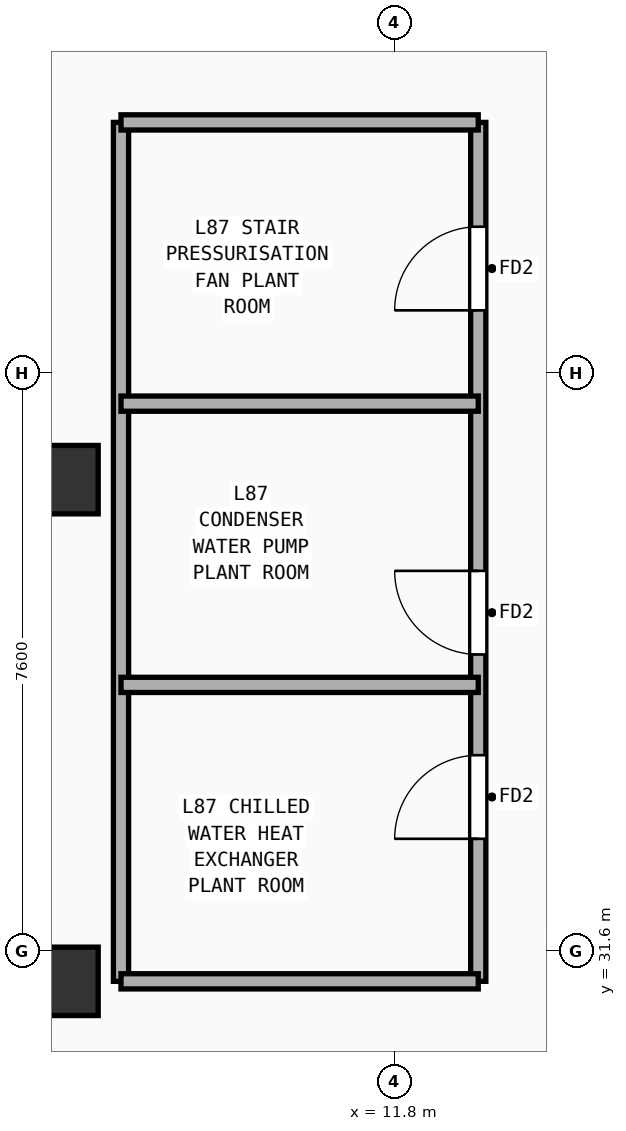
"""IFC4 building model, lengths in metres.
Left out: names, types, materials, properties, quantities, classifications, styles, units other than length and angle.
Written with IfcOpenShell. Run it as: python <this file> out.ifc"""

import sys

from ifc_helpers import new_model, si_unit, direction, frame, frame_2d, origin, origin_2d, place, context, subcontext, project, spatial, rectangle, extrude, element, fill, save


model = new_model("IFC4")
c1 = context("Model", 3, precision=1e-05, world=origin(), true_north=direction((0.0, 1.0)))
c2 = subcontext(c1, "Body", "Model", "MODEL_VIEW")
j1 = project(units=[si_unit("LENGTHUNIT", "METRE"), si_unit("PLANEANGLEUNIT", "RADIAN")], contexts=[c1])
p1 = place(None, origin())
s1 = spatial("IfcSite", under=j1, at=p1, CompositionType="ELEMENT")
p2 = place(p1, origin())
s2 = spatial("IfcBuilding", under=s1, at=p2, CompositionType="ELEMENT")
p3 = place(p2, frame((0.0, 0.0, 338.8)))
s3 = spatial("IfcBuildingStorey", under=s2, at=p3, CompositionType="ELEMENT", Elevation=338.8)
for number, where, z_axis, x_axis in (
    (1, (7.45, 31.2, 0.0), (0.0, 0.0, 1.0), (1.0, 0.0, 0.0)),
    (2, (7.45, 37.8, 0.0), (0.0, 0.0, 1.0), (1.0, 0.0, 0.0)),
):
    element("IfcColumn", number, at=place(p3, frame(where, z_axis=z_axis, x_axis=x_axis)), inside=s3, PredefinedType="COLUMN", context=c2, shape_type="SweptSolid", body=[
        extrude(rectangle(XDim=0.9, YDim=0.9, at=origin_2d()), origin(), (0.0, 0.0, 1.0), 5.02),
    ])
p4 = place(p3, frame((12.9, 31.2, 0.0), z_axis=(0.0, 0.0, 1.0), x_axis=(0.0, 1.0, 0.0)))
e3 = element("IfcWall", 3, at=p4, inside=s3, PredefinedType="PARTITIONING", context=c2, shape_type="SweptSolid", body=[
    extrude(rectangle(XDim=11.3, YDim=0.2, at=frame_2d((5.65, 0.0))), origin(), (0.0, 0.0, 1.0), 5.02),
])
p5 = place(p4, frame((1.875, 0.0, 0.0)))
e4 = element("IfcOpeningElement", 4, at=p5, cuts=e3, PredefinedType="OPENING", context=c2, shape_type="SweptSolid", body=[
    extrude(rectangle(XDim=1.1, YDim=2.2, at=frame_2d((0.55, 1.1))), frame((0.0, 0.11, 0.0), z_axis=(0.0, -1.0, 0.0), x_axis=(1.0, 0.0, 0.0)), (0.0, 0.0, 1.0), 0.22),
])
p6 = place(p4, frame((4.3, 0.0, 0.0)))
e5 = element("IfcOpeningElement", 5, at=p6, cuts=e3, PredefinedType="OPENING", context=c2, shape_type="SweptSolid", body=[
    extrude(rectangle(XDim=1.1, YDim=2.2, at=frame_2d((0.55, 1.1))), frame((0.0, 0.11, 0.0), z_axis=(0.0, -1.0, 0.0), x_axis=(1.0, 0.0, 0.0)), (0.0, 0.0, 1.0), 0.22),
])
p7 = place(p4, frame((8.827, 0.0, 0.0)))
e6 = element("IfcOpeningElement", 6, at=p7, cuts=e3, PredefinedType="OPENING", context=c2, shape_type="SweptSolid", body=[
    extrude(rectangle(XDim=1.1, YDim=2.2, at=frame_2d((0.55, 1.1))), frame((0.0, 0.11, 0.0), z_axis=(0.0, -1.0, 0.0), x_axis=(1.0, 0.0, 0.0)), (0.0, 0.0, 1.0), 0.22),
])
p8 = place(p3, frame((8.2, 31.2, 0.0), z_axis=(0.0, 0.0, 1.0), x_axis=(0.0, 1.0, 0.0)))
e7 = element("IfcWall", 7, at=p8, inside=s3, PredefinedType="PARTITIONING", context=c2, shape_type="SweptSolid", body=[
    extrude(rectangle(XDim=11.3, YDim=0.2, at=frame_2d((5.65, 0.0))), origin(), (0.0, 0.0, 1.0), 5.02),
])
p9 = place(p3, frame((8.2, 31.2, 0.0), z_axis=(0.0, 0.0, 1.0), x_axis=(1.0, 0.0, 0.0)))
e8 = element("IfcWall", 8, at=p9, inside=s3, PredefinedType="PARTITIONING", context=c2, shape_type="SweptSolid", body=[
    extrude(rectangle(XDim=4.7, YDim=0.2, at=frame_2d((2.35, 0.0))), origin(), (0.0, 0.0, 1.0), 4.22),
])
p10 = place(p3, frame((8.2, 42.5, 0.0), z_axis=(0.0, 0.0, 1.0), x_axis=(1.0, 0.0, 0.0)))
e9 = element("IfcWall", 9, at=p10, inside=s3, PredefinedType="PARTITIONING", context=c2, shape_type="SweptSolid", body=[
    extrude(rectangle(XDim=4.7, YDim=0.2, at=frame_2d((2.35, 0.0))), origin(), (0.0, 0.0, 1.0), 4.72),
])
for number, where, z_axis, x_axis in (
    (10, (8.2, 35.1, 0.0), (0.0, 0.0, 1.0), (1.0, 0.0, 0.0)),
    (11, (8.2, 38.8, 0.0), (0.0, 0.0, 1.0), (1.0, 0.0, 0.0)),
):
    element("IfcWall", number, at=place(p3, frame(where, z_axis=z_axis, x_axis=x_axis)), inside=s3, PredefinedType="PARTITIONING", context=c2, shape_type="SweptSolid", body=[
        extrude(rectangle(XDim=4.7, YDim=0.2, at=frame_2d((2.35, 0.0))), origin(), (0.0, 0.0, 1.0), 5.02),
    ])
p11 = place(p5, origin())
e12 = element("IfcDoor", 12, at=p11, inside=s3, OperationType="SINGLE_SWING_LEFT", PredefinedType="DOOR", context=c2, shape_type="SweptSolid", body=[
    extrude(rectangle(XDim=1.1, YDim=2.2, at=frame_2d((0.55, 1.1))), frame((0.0, 0.025, 0.0), z_axis=(0.0, -1.0, 0.0), x_axis=(1.0, 0.0, 0.0)), (0.0, 0.0, 1.0), 0.05),
])
fill(e4, e12)
p12 = place(p6, origin())
e13 = element("IfcDoor", 13, at=p12, inside=s3, OperationType="SINGLE_SWING_RIGHT", PredefinedType="DOOR", context=c2, shape_type="SweptSolid", body=[
    extrude(rectangle(XDim=1.1, YDim=2.2, at=frame_2d((0.55, 1.1))), frame((0.0, 0.025, 0.0), z_axis=(0.0, -1.0, 0.0), x_axis=(1.0, 0.0, 0.0)), (0.0, 0.0, 1.0), 0.05),
])
fill(e5, e13)
p13 = place(p7, origin())
e14 = element("IfcDoor", 14, at=p13, inside=s3, OperationType="SINGLE_SWING_LEFT", PredefinedType="DOOR", context=c2, shape_type="SweptSolid", body=[
    extrude(rectangle(XDim=1.1, YDim=2.2, at=frame_2d((0.55, 1.1))), frame((0.0, 0.025, 0.0), z_axis=(0.0, -1.0, 0.0), x_axis=(1.0, 0.0, 0.0)), (0.0, 0.0, 1.0), 0.05),
])
fill(e6, e14)
save(model, sys.argv[1])
